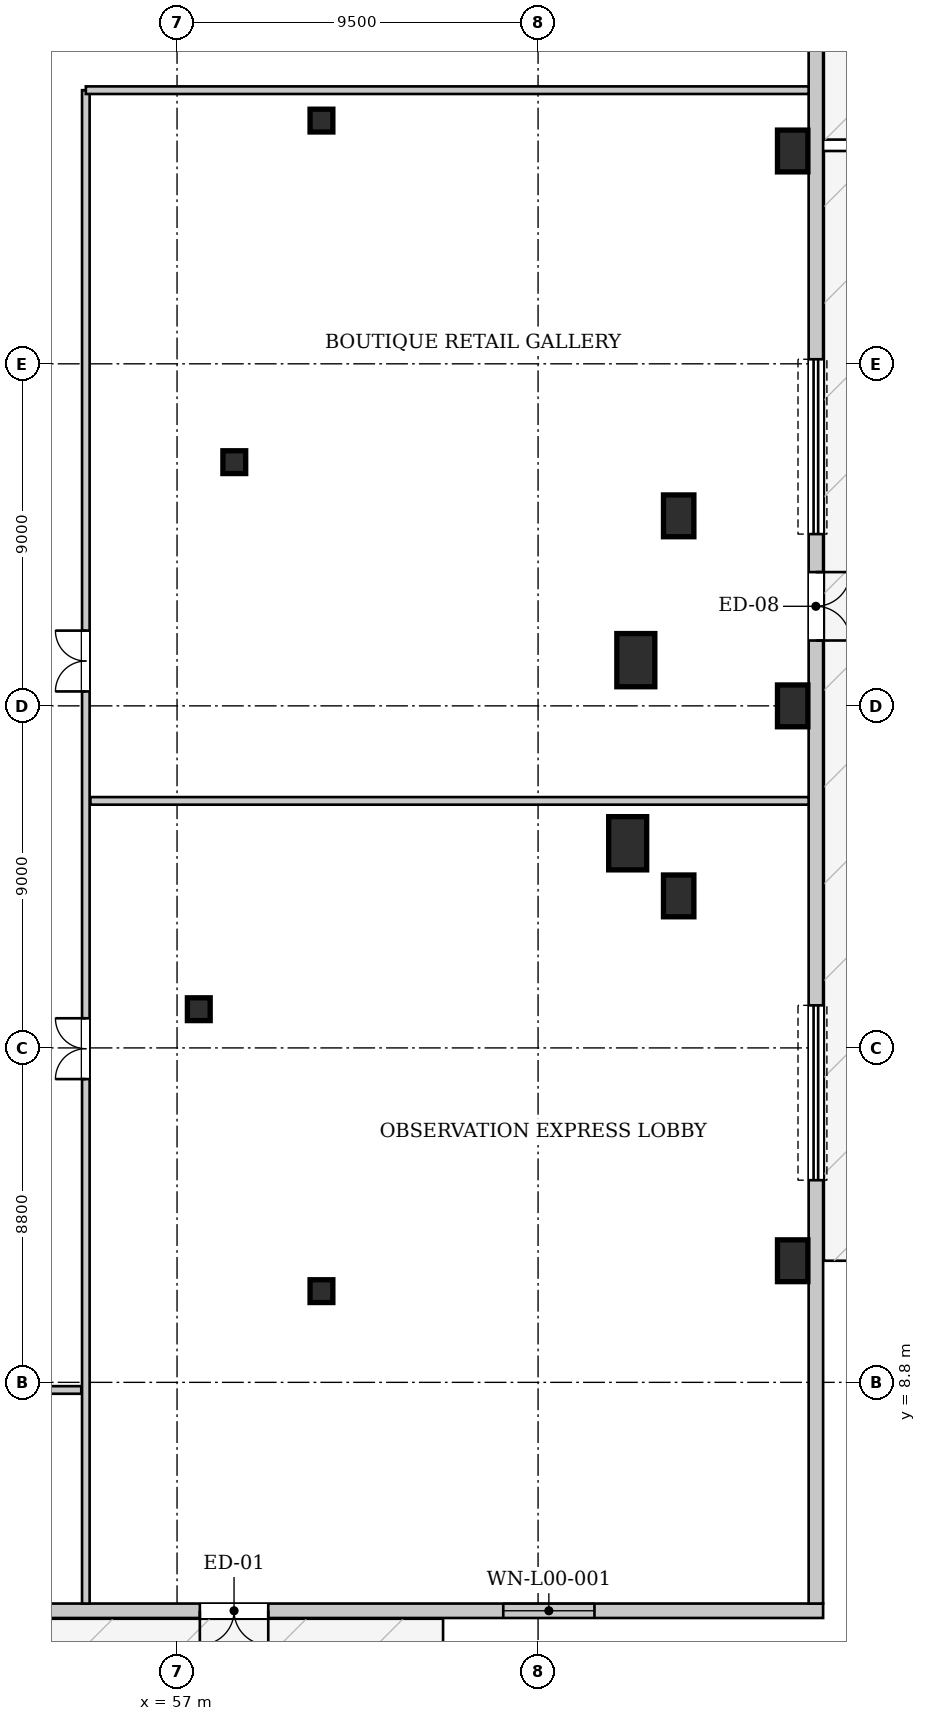
"""IFC4 building model, lengths in metres.
Left out: names, types, materials, properties, quantities, classifications, styles, units other than length and angle.
Written with IfcOpenShell. Run it as: python <this file> out.ifc"""

import sys

from ifc_helpers import new_model, si_unit, direction, frame, frame_2d, origin, origin_2d, place, context, subcontext, project, spatial, rectangle, hollow_rectangle, extrude, source, transform, mapped, element, fill, save


model = new_model("IFC4")
c1 = context("Model", 3, precision=1e-05, world=origin(), true_north=direction((0.0, 1.0)))
c2 = subcontext(c1, "Body", "Model", "MODEL_VIEW")
j1 = project(units=[si_unit("LENGTHUNIT", "METRE"), si_unit("PLANEANGLEUNIT", "RADIAN")], contexts=[c1])
p1 = place(None, origin())
s1 = spatial("IfcSite", under=j1, at=p1, CompositionType="ELEMENT")
p2 = place(p1, origin())
s2 = spatial("IfcBuilding", under=s1, at=p2, CompositionType="ELEMENT")
p3 = place(p2, origin())
s3 = spatial("IfcBuildingStorey", under=s2, at=p3, CompositionType="ELEMENT", Elevation=0.0)
m1 = source(origin(), c2, "Body", "SweptSolid", [
    extrude(rectangle(XDim=1.0, YDim=1.4, at=origin_2d()), origin(), (0.0, 0.0, 1.0), 5.235),
])
for number, where, z_axis, x_axis in (
    (1, (68.858, 22.985, 0.0), (0.0, 0.0, 1.0), (1.0, 0.0, 0.0)),
    (2, (69.073, 27.803, 0.0), (0.0, 0.0, 1.0), (1.0, 0.0, 0.0)),
):
    element("IfcColumn", number, at=place(p3, frame(where, z_axis=z_axis, x_axis=x_axis)), inside=s3, PredefinedType="COLUMN", context=c2, shape_type="MappedRepresentation", body=[
        mapped(m1, transform((0.0, 0.0, 0.0), x_axis=(1.0, 0.0, 0.0), y_axis=(0.0, 1.0, 0.0), z_axis=(0.0, 0.0, 1.0), scale=1.0)),
    ])
m2 = source(origin(), c2, "Body", "SweptSolid", [
    extrude(hollow_rectangle(XDim=0.6, YDim=0.6, WallThickness=0.035, at=origin_2d()), origin(), (0.0, 0.0, 1.0), 5.235),
])
for number, where, z_axis, x_axis in (
    (3, (60.8, 11.2, 0.0), (0.0, 0.0, 1.0), (1.0, 0.0, 0.0)),
    (4, (60.8, 42.0, 0.0), (0.0, 0.0, 1.0), (1.0, 0.0, 0.0)),
):
    element("IfcColumn", number, at=place(p3, frame(where, z_axis=z_axis, x_axis=x_axis)), inside=s3, PredefinedType="COLUMN", context=c2, shape_type="MappedRepresentation", body=[
        mapped(m2, transform((0.0, 0.0, 0.0), x_axis=(1.0, 0.0, 0.0), y_axis=(0.0, 1.0, 0.0), z_axis=(0.0, 0.0, 1.0), scale=1.0)),
    ])
m3 = source(origin(), c2, "Body", "SweptSolid", [
    extrude(rectangle(XDim=0.8, YDim=1.1, at=origin_2d()), origin(), (0.0, 0.0, 1.0), 5.235),
])
for number, where, z_axis, x_axis in (
    (5, (73.2, 12.0, 0.0), (0.0, 0.0, 1.0), (1.0, 0.0, 0.0)),
    (6, (73.2, 26.6, 0.0), (0.0, 0.0, 1.0), (1.0, 0.0, 0.0)),
    (7, (73.2, 41.2, 0.0), (0.0, 0.0, 1.0), (1.0, 0.0, 0.0)),
):
    element("IfcColumn", number, at=place(p3, frame(where, z_axis=z_axis, x_axis=x_axis)), inside=s3, PredefinedType="COLUMN", context=c2, shape_type="MappedRepresentation", body=[
        mapped(m3, transform((0.0, 0.0, 0.0), x_axis=(1.0, 0.0, 0.0), y_axis=(0.0, 1.0, 0.0), z_axis=(0.0, 0.0, 1.0), scale=1.0)),
    ])
for number, where, z_axis, x_axis in (
    (8, (58.507, 33.013, 0.0), (0.0, 0.0, 1.0), (1.0, 0.0, 0.0)),
    (9, (57.572, 18.618, 0.0), (0.0, 0.0, 1.0), (1.0, 0.0, 0.0)),
):
    element("IfcColumn", number, at=place(p3, frame(where, z_axis=z_axis, x_axis=x_axis)), inside=s3, PredefinedType="COLUMN", context=c2, shape_type="MappedRepresentation", body=[
        mapped(m2, transform((0.0, 0.0, 0.0), x_axis=(1.0, 0.0, 0.0), y_axis=(0.0, 1.0, 0.0), z_axis=(0.0, 0.0, 1.0), scale=1.0)),
    ])
for number, where, z_axis, x_axis in (
    (10, (70.2, 21.6, 0.0), (0.0, 0.0, 1.0), (1.0, 0.0, 0.0)),
    (11, (70.2, 31.6, 0.0), (0.0, 0.0, 1.0), (1.0, 0.0, 0.0)),
):
    element("IfcColumn", number, at=place(p3, frame(where, z_axis=z_axis, x_axis=x_axis)), inside=s3, PredefinedType="COLUMN", context=c2, shape_type="MappedRepresentation", body=[
        mapped(m3, transform((0.0, 0.0, 0.0), x_axis=(1.0, 0.0, 0.0), y_axis=(0.0, 1.0, 0.0), z_axis=(0.0, 0.0, 1.0), scale=1.0)),
    ])
p4 = place(p3, frame((74.0, 2.79, 0.0), z_axis=(0.0, 0.0, 1.0), x_axis=(-1.0, 0.0, 0.0)))
e12 = element("IfcWall", 12, at=p4, inside=s3, PredefinedType="SOLIDWALL", context=c2, shape_type="SweptSolid", body=[
    extrude(rectangle(XDim=32.8, YDim=0.38, at=frame_2d((16.4, 0.0))), origin(), (0.0, 0.0, 1.0), 4.522),
])
p5 = place(p4, frame((14.6, 0.0, 0.0)))
e13 = element("IfcOpeningElement", 13, at=p5, cuts=e12, PredefinedType="OPENING", context=c2, shape_type="SweptSolid", body=[
    extrude(rectangle(XDim=1.8, YDim=2.4, at=frame_2d((0.9, 1.2))), frame((0.0, 0.2, 0.0), z_axis=(0.0, -1.0, 0.0), x_axis=(1.0, 0.0, 0.0)), (0.0, 0.0, 1.0), 0.4),
])
p6 = place(p4, frame((23.6, 0.0, 0.0)))
e14 = element("IfcOpeningElement", 14, at=p6, cuts=e12, PredefinedType="OPENING", context=c2, shape_type="SweptSolid", body=[
    extrude(rectangle(XDim=1.8, YDim=2.4, at=frame_2d((0.9, 1.2))), frame((0.0, 0.2, 0.0), z_axis=(0.0, -1.0, 0.0), x_axis=(1.0, 0.0, 0.0)), (0.0, 0.0, 1.0), 0.4),
])
p7 = place(p4, frame((6.016, 0.0, 0.85)))
e15 = element("IfcOpeningElement", 15, at=p7, cuts=e12, PredefinedType="OPENING", context=c2, shape_type="SweptSolid", body=[
    extrude(rectangle(XDim=2.4, YDim=3.0, at=frame_2d((1.2, 1.5))), frame((0.0, 0.2, 0.0), z_axis=(0.0, -1.0, 0.0), x_axis=(1.0, 0.0, 0.0)), (0.0, 0.0, 1.0), 0.4),
])
p8 = place(p3, frame((73.81, 50.22, 0.0), z_axis=(0.0, 0.0, 1.0), x_axis=(0.0, -1.0, 0.0)))
e16 = element("IfcWall", 16, at=p8, inside=s3, PredefinedType="SOLIDWALL", context=c2, shape_type="SweptSolid", body=[
    extrude(rectangle(XDim=47.24, YDim=0.38, at=frame_2d((23.62, 0.0))), origin(), (0.0, 0.0, 1.0), 4.522),
])
p9 = place(p8, frame((20.1, 0.0, 0.0)))
e17 = element("IfcOpeningElement", 17, at=p9, cuts=e16, PredefinedType="OPENING", context=c2, shape_type="SweptSolid", body=[
    extrude(rectangle(XDim=1.8, YDim=2.4, at=frame_2d((0.9, 1.2))), frame((0.0, 0.2, 0.0), z_axis=(0.0, -1.0, 0.0), x_axis=(1.0, 0.0, 0.0)), (0.0, 0.0, 1.0), 0.4),
])
p10 = place(p8, frame((14.5, 0.0, 0.0)))
e18 = element("IfcOpeningElement", 18, at=p10, cuts=e16, PredefinedType="OPENING", context=c2, shape_type="SweptSolid", body=[
    extrude(rectangle(XDim=4.6, YDim=3.8, at=frame_2d((2.3, 1.9))), frame((0.0, 0.2, 0.0), z_axis=(0.0, -1.0, 0.0), x_axis=(1.0, 0.0, 0.0)), (0.0, 0.0, 1.0), 0.4),
])
p11 = place(p8, frame((31.5, 0.0, 0.0)))
e19 = element("IfcOpeningElement", 19, at=p11, cuts=e16, PredefinedType="OPENING", context=c2, shape_type="SweptSolid", body=[
    extrude(rectangle(XDim=4.6, YDim=3.8, at=frame_2d((2.3, 1.9))), frame((0.0, 0.2, 0.0), z_axis=(0.0, -1.0, 0.0), x_axis=(1.0, 0.0, 0.0)), (0.0, 0.0, 1.0), 0.4),
])
p12 = place(p3, frame((19.72, 8.6, 0.0), z_axis=(0.0, 0.0, 1.0), x_axis=(1.0, 0.0, 0.0)))
e20 = element("IfcWall", 20, at=p12, inside=s3, PredefinedType="PARTITIONING", context=c2, shape_type="SweptSolid", body=[
    extrude(rectangle(XDim=34.76, YDim=0.2, at=frame_2d((17.38, 0.0))), origin(), (0.0, 0.0, 1.0), 4.43),
])
p13 = place(p3, frame((54.6, 2.98, 0.0), z_axis=(0.0, 0.0, 1.0), x_axis=(0.0, 1.0, 0.0)))
e21 = element("IfcWall", 21, at=p13, inside=s3, PredefinedType="PARTITIONING", context=c2, shape_type="SweptSolid", body=[
    extrude(rectangle(XDim=39.82, YDim=0.2, at=frame_2d((19.91, 0.0))), origin(), (0.0, 0.0, 1.0), 4.43),
])
p14 = place(p13, frame((13.8, 0.0, 0.0)))
e22 = element("IfcOpeningElement", 22, at=p14, cuts=e21, PredefinedType="OPENING", context=c2, shape_type="SweptSolid", body=[
    extrude(rectangle(XDim=1.6, YDim=2.2, at=frame_2d((0.8, 1.1))), frame((0.0, 0.11, 0.0), z_axis=(0.0, -1.0, 0.0), x_axis=(1.0, 0.0, 0.0)), (0.0, 0.0, 1.0), 0.22),
])
p15 = place(p13, frame((24.0, 0.0, 0.0)))
e23 = element("IfcOpeningElement", 23, at=p15, cuts=e21, PredefinedType="OPENING", context=c2, shape_type="SweptSolid", body=[
    extrude(rectangle(XDim=1.6, YDim=2.2, at=frame_2d((0.8, 1.1))), frame((0.0, 0.11, 0.0), z_axis=(0.0, -1.0, 0.0), x_axis=(1.0, 0.0, 0.0)), (0.0, 0.0, 1.0), 0.22),
])
p16 = place(p3, frame((54.72, 24.1, 0.0), z_axis=(0.0, 0.0, 1.0), x_axis=(1.0, 0.0, 0.0)))
e24 = element("IfcWall", 24, at=p16, inside=s3, PredefinedType="PARTITIONING", context=c2, shape_type="SweptSolid", body=[
    extrude(rectangle(XDim=18.9, YDim=0.2, at=frame_2d((9.45, 0.0))), origin(), (0.0, 0.0, 1.0), 4.43),
])
p17 = place(p3, frame((54.6, 42.8, 0.0), z_axis=(0.0, 0.0, 1.0), x_axis=(1.0, 0.0, 0.0)))
e25 = element("IfcWall", 25, at=p17, inside=s3, PredefinedType="PARTITIONING", context=c2, shape_type="SweptSolid", body=[
    extrude(rectangle(XDim=19.02, YDim=0.2, at=frame_2d((9.51, 0.0))), origin(), (0.0, 0.0, 1.0), 4.43),
])
m4 = source(origin(), c2, "Body", "SweptSolid", [
    extrude(rectangle(XDim=1.8, YDim=2.4, at=frame_2d((0.9, 1.2))), frame((0.0, 0.025, 0.0), z_axis=(0.0, -1.0, 0.0), x_axis=(1.0, 0.0, 0.0)), (0.0, 0.0, 1.0), 0.05),
])
p18 = place(p5, origin())
e26 = element("IfcDoor", 26, at=p18, inside=s3, OperationType="DOUBLE_DOOR_SINGLE_SWING", PredefinedType="DOOR", context=c2, shape_type="MappedRepresentation", body=[
    mapped(m4, transform((0.0, 0.0, 0.0), x_axis=(1.0, 0.0, 0.0), y_axis=(0.0, 1.0, 0.0), z_axis=(0.0, 0.0, 1.0), scale=1.0)),
])
fill(e13, e26)
p19 = place(p9, origin())
e27 = element("IfcDoor", 27, at=p19, inside=s3, OperationType="DOUBLE_DOOR_SINGLE_SWING", PredefinedType="DOOR", context=c2, shape_type="MappedRepresentation", body=[
    mapped(m4, transform((0.0, 0.0, 0.0), x_axis=(1.0, 0.0, 0.0), y_axis=(0.0, 1.0, 0.0), z_axis=(0.0, 0.0, 1.0), scale=1.0)),
])
fill(e17, e27)
m5 = source(origin(), c2, "Body", "SweptSolid", [
    extrude(rectangle(XDim=4.6, YDim=3.8, at=frame_2d((2.3, 1.9))), frame((0.0, 0.025, 0.0), z_axis=(0.0, -1.0, 0.0), x_axis=(1.0, 0.0, 0.0)), (0.0, 0.0, 1.0), 0.05),
])
p20 = place(p10, origin())
e28 = element("IfcDoor", 28, at=p20, inside=s3, OperationType="ROLLINGUP", PredefinedType="GATE", context=c2, shape_type="MappedRepresentation", body=[
    mapped(m5, transform((0.0, 0.0, 0.0), x_axis=(1.0, 0.0, 0.0), y_axis=(0.0, 1.0, 0.0), z_axis=(0.0, 0.0, 1.0), scale=1.0)),
])
fill(e18, e28)
p21 = place(p11, origin())
e29 = element("IfcDoor", 29, at=p21, inside=s3, OperationType="ROLLINGUP", PredefinedType="GATE", context=c2, shape_type="MappedRepresentation", body=[
    mapped(m5, transform((0.0, 0.0, 0.0), x_axis=(1.0, 0.0, 0.0), y_axis=(0.0, 1.0, 0.0), z_axis=(0.0, 0.0, 1.0), scale=1.0)),
])
fill(e19, e29)
m6 = source(origin(), c2, "Body", "SweptSolid", [
    extrude(rectangle(XDim=2.4, YDim=3.0, at=frame_2d((1.2, 1.5))), frame((0.0, 0.03, 0.0), z_axis=(0.0, -1.0, 0.0), x_axis=(1.0, 0.0, 0.0)), (0.0, 0.0, 1.0), 0.06),
])
p22 = place(p7, origin())
e30 = element("IfcWindow", 30, at=p22, inside=s3, PartitioningType="SINGLE_PANEL", PredefinedType="WINDOW", context=c2, shape_type="MappedRepresentation", body=[
    mapped(m6, transform((0.0, 0.0, 0.0), x_axis=(1.0, 0.0, 0.0), y_axis=(0.0, 1.0, 0.0), z_axis=(0.0, 0.0, 1.0), scale=1.0)),
])
fill(e15, e30)
m7 = source(origin(), c2, "Body", "SweptSolid", [
    extrude(rectangle(XDim=1.6, YDim=2.2, at=frame_2d((0.8, 1.1))), frame((0.0, 0.025, 0.0), z_axis=(0.0, -1.0, 0.0), x_axis=(1.0, 0.0, 0.0)), (0.0, 0.0, 1.0), 0.05),
])
p23 = place(p14, origin())
e31 = element("IfcDoor", 31, at=p23, inside=s3, OperationType="DOUBLE_DOOR_SINGLE_SWING", PredefinedType="DOOR", context=c2, shape_type="MappedRepresentation", body=[
    mapped(m7, transform((0.0, 0.0, 0.0), x_axis=(1.0, 0.0, 0.0), y_axis=(0.0, 1.0, 0.0), z_axis=(0.0, 0.0, 1.0), scale=1.0)),
])
fill(e22, e31)
p24 = place(p15, origin())
e32 = element("IfcDoor", 32, at=p24, inside=s3, OperationType="DOUBLE_DOOR_SINGLE_SWING", PredefinedType="DOOR", context=c2, shape_type="MappedRepresentation", body=[
    mapped(m7, transform((0.0, 0.0, 0.0), x_axis=(1.0, 0.0, 0.0), y_axis=(0.0, 1.0, 0.0), z_axis=(0.0, 0.0, 1.0), scale=1.0)),
])
fill(e23, e32)
save(model, sys.argv[1])
